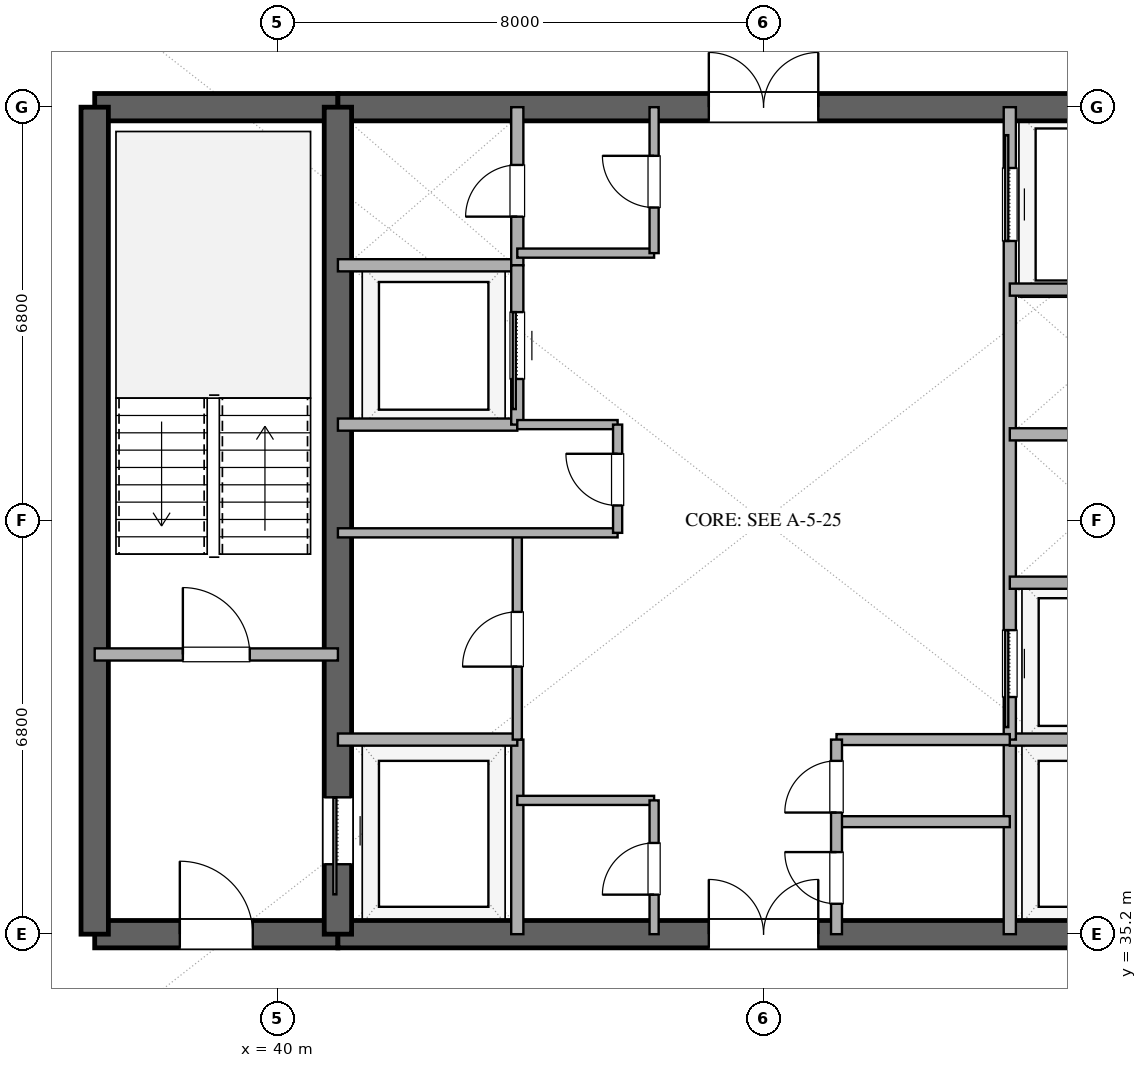
"""IFC4 building model, lengths in metres.
Left out: names, types, materials, properties, quantities, classifications, styles, units other than length and angle.
Written with IfcOpenShell. Run it as: python <this file> out.ifc"""

import sys

from ifc_helpers import new_model, si_unit, direction, frame, frame_2d, origin, place, context, subcontext, project, spatial, rectangle, extrude, element, fill, save


model = new_model("IFC4")
c1 = context("Model", 3, precision=1e-05, world=origin(), true_north=direction((0.0, 1.0)))
c2 = subcontext(c1, "Body", "Model", "MODEL_VIEW")
j1 = project(units=[si_unit("LENGTHUNIT", "METRE"), si_unit("PLANEANGLEUNIT", "RADIAN")], contexts=[c1])
p1 = place(None, origin())
s1 = spatial("IfcSite", under=j1, at=p1, CompositionType="ELEMENT")
p2 = place(p1, origin())
s2 = spatial("IfcBuilding", under=s1, at=p2, CompositionType="ELEMENT")
p3 = place(p2, frame((0.0, 0.0, 154.2)))
s3 = spatial("IfcBuildingStorey", under=s2, at=p3, CompositionType="ELEMENT", Elevation=154.2)
p4 = place(p3, frame((37.0, 35.2, 0.0), z_axis=(0.0, 0.0, 1.0), x_axis=(1.0, 0.0, 0.0)))
e1 = element("IfcWall", 1, at=p4, inside=s3, PredefinedType="SHEAR", context=c2, shape_type="SweptSolid", body=[
    extrude(rectangle(XDim=4.0, YDim=0.45, at=frame_2d((2.0, 0.0))), origin(), (0.0, 0.0, 1.0), 3.38),
])
p5 = place(p4, frame((1.4, 0.0, 0.0)))
e2 = element("IfcOpeningElement", 2, at=p5, cuts=e1, PredefinedType="OPENING", context=c2, shape_type="SweptSolid", body=[
    extrude(rectangle(XDim=1.2, YDim=2.15, at=frame_2d((0.6, 1.075))), frame((0.0, 0.235, 0.0), z_axis=(0.0, -1.0, 0.0), x_axis=(1.0, 0.0, 0.0)), (0.0, 0.0, 1.0), 0.47),
])
p6 = place(p3, frame((41.0, 35.2, 0.0), z_axis=(0.0, 0.0, 1.0), x_axis=(1.0, 0.0, 0.0)))
e3 = element("IfcWall", 3, at=p6, inside=s3, PredefinedType="SHEAR", context=c2, shape_type="SweptSolid", body=[
    extrude(rectangle(XDim=14.0, YDim=0.45, at=frame_2d((7.0, 0.0))), origin(), (0.0, 0.0, 1.0), 3.38),
])
p7 = place(p6, frame((6.1, 0.0, 0.0)))
e4 = element("IfcOpeningElement", 4, at=p7, cuts=e3, PredefinedType="OPENING", context=c2, shape_type="SweptSolid", body=[
    extrude(rectangle(XDim=1.8, YDim=2.25, at=frame_2d((0.9, 1.125))), frame((0.0, 0.235, 0.0), z_axis=(0.0, -1.0, 0.0), x_axis=(1.0, 0.0, 0.0)), (0.0, 0.0, 1.0), 0.47),
])
p8 = place(p3, frame((37.0, 48.8, 0.0), z_axis=(0.0, 0.0, 1.0), x_axis=(1.0, 0.0, 0.0)))
e5 = element("IfcWall", 5, at=p8, inside=s3, PredefinedType="SHEAR", context=c2, shape_type="SweptSolid", body=[
    extrude(rectangle(XDim=4.0, YDim=0.45, at=frame_2d((2.0, 0.0))), origin(), (0.0, 0.0, 1.0), 3.38),
])
p9 = place(p3, frame((41.0, 48.8, 0.0), z_axis=(0.0, 0.0, 1.0), x_axis=(1.0, 0.0, 0.0)))
e6 = element("IfcWall", 6, at=p9, inside=s3, PredefinedType="SHEAR", context=c2, shape_type="SweptSolid", body=[
    extrude(rectangle(XDim=14.0, YDim=0.45, at=frame_2d((7.0, 0.0))), origin(), (0.0, 0.0, 1.0), 3.38),
])
p10 = place(p9, frame((6.1, 0.0, 0.0)))
e7 = element("IfcOpeningElement", 7, at=p10, cuts=e6, PredefinedType="OPENING", context=c2, shape_type="SweptSolid", body=[
    extrude(rectangle(XDim=1.8, YDim=2.25, at=frame_2d((0.9, 1.125))), frame((0.0, 0.235, 0.0), z_axis=(0.0, -1.0, 0.0), x_axis=(1.0, 0.0, 0.0)), (0.0, 0.0, 1.0), 0.47),
])
p11 = place(p3, frame((37.0, 35.2, 0.0), z_axis=(0.0, 0.0, 1.0), x_axis=(0.0, 1.0, 0.0)))
e8 = element("IfcWall", 8, at=p11, inside=s3, PredefinedType="SHEAR", context=c2, shape_type="SweptSolid", body=[
    extrude(rectangle(XDim=13.6, YDim=0.45, at=frame_2d((6.8, 0.0))), origin(), (0.0, 0.0, 1.0), 3.38),
])
p12 = place(p3, frame((41.0, 35.2, 0.0), z_axis=(0.0, 0.0, 1.0), x_axis=(0.0, 1.0, 0.0)))
e9 = element("IfcWall", 9, at=p12, inside=s3, PredefinedType="SHEAR", context=c2, shape_type="SweptSolid", body=[
    extrude(rectangle(XDim=13.6, YDim=0.45, at=frame_2d((6.8, 0.0))), origin(), (0.0, 0.0, 1.0), 3.38),
])
p13 = place(p12, frame((1.15, 0.0, 0.0)))
e10 = element("IfcOpeningElement", 10, at=p13, cuts=e9, PredefinedType="OPENING", context=c2, shape_type="SweptSolid", body=[
    extrude(rectangle(XDim=1.1, YDim=2.2, at=frame_2d((0.55, 1.1))), frame((0.0, 0.235, 0.0), z_axis=(0.0, -1.0, 0.0), x_axis=(1.0, 0.0, 0.0)), (0.0, 0.0, 1.0), 0.47),
])
p14 = place(p3, frame((37.0, 39.8, 0.0), z_axis=(0.0, 0.0, 1.0), x_axis=(1.0, 0.0, 0.0)))
e11 = element("IfcWall", 11, at=p14, inside=s3, PredefinedType="SOLIDWALL", context=c2, shape_type="SweptSolid", body=[
    extrude(rectangle(XDim=4.0, YDim=0.2, at=frame_2d((2.0, 0.0))), origin(), (0.0, 0.0, 1.0), 2.74),
])
p15 = place(p14, frame((1.45, 0.0, 0.0)))
e12 = element("IfcOpeningElement", 12, at=p15, cuts=e11, PredefinedType="OPENING", context=c2, shape_type="SweptSolid", body=[
    extrude(rectangle(XDim=1.1, YDim=2.15, at=frame_2d((0.55, 1.075))), frame((0.0, 0.11, 0.0), z_axis=(0.0, -1.0, 0.0), x_axis=(1.0, 0.0, 0.0)), (0.0, 0.0, 1.0), 0.22),
])
p16 = place(p3, frame((43.95, 35.2, 0.0), z_axis=(0.0, 0.0, 1.0), x_axis=(0.0, 1.0, 0.0)))
e13 = element("IfcWall", 13, at=p16, inside=s3, PredefinedType="SOLIDWALL", context=c2, shape_type="SweptSolid", body=[
    extrude(rectangle(XDim=3.2, YDim=0.2, at=frame_2d((1.6, 0.0))), origin(), (0.0, 0.0, 1.0), 2.74),
])
p17 = place(p3, frame((41.0, 38.4, 0.0), z_axis=(0.0, 0.0, 1.0), x_axis=(1.0, 0.0, 0.0)))
e14 = element("IfcWall", 14, at=p17, inside=s3, PredefinedType="SOLIDWALL", context=c2, shape_type="SweptSolid", body=[
    extrude(rectangle(XDim=2.95, YDim=0.2, at=frame_2d((1.475, 0.0))), origin(), (0.0, 0.0, 1.0), 2.74),
])
p18 = place(p3, frame((52.05, 35.2, 0.0), z_axis=(0.0, 0.0, 1.0), x_axis=(0.0, 1.0, 0.0)))
e15 = element("IfcWall", 15, at=p18, inside=s3, PredefinedType="SOLIDWALL", context=c2, shape_type="SweptSolid", body=[
    extrude(rectangle(XDim=3.2, YDim=0.2, at=frame_2d((1.6, 0.0))), origin(), (0.0, 0.0, 1.0), 2.74),
])
for number, where, z_axis, x_axis in (
    (16, (52.05, 38.4, 0.0), (0.0, 0.0, 1.0), (1.0, 0.0, 0.0)),
    (17, (41.0, 46.2, 0.0), (0.0, 0.0, 1.0), (1.0, 0.0, 0.0)),
):
    element("IfcWall", number, at=place(p3, frame(where, z_axis=z_axis, x_axis=x_axis)), inside=s3, PredefinedType="SOLIDWALL", context=c2, shape_type="SweptSolid", body=[
        extrude(rectangle(XDim=2.95, YDim=0.2, at=frame_2d((1.475, 0.0))), origin(), (0.0, 0.0, 1.0), 2.74),
    ])
p19 = place(p3, frame((43.95, 46.2, 0.0), z_axis=(0.0, 0.0, 1.0), x_axis=(0.0, 1.0, 0.0)))
e18 = element("IfcWall", 18, at=p19, inside=s3, PredefinedType="SOLIDWALL", context=c2, shape_type="SweptSolid", body=[
    extrude(rectangle(XDim=2.6, YDim=0.2, at=frame_2d((1.3, 0.0))), origin(), (0.0, 0.0, 1.0), 2.74),
])
p20 = place(p19, frame((0.8, 0.0, 0.0)))
e19 = element("IfcOpeningElement", 19, at=p20, cuts=e18, PredefinedType="OPENING", context=c2, shape_type="SweptSolid", body=[
    extrude(rectangle(XDim=0.85, YDim=2.15, at=frame_2d((0.425, 1.075))), frame((0.0, 0.11, 0.0), z_axis=(0.0, -1.0, 0.0), x_axis=(1.0, 0.0, 0.0)), (0.0, 0.0, 1.0), 0.22),
])
p21 = place(p3, frame((41.0, 43.58, 0.0), z_axis=(0.0, 0.0, 1.0), x_axis=(1.0, 0.0, 0.0)))
e20 = element("IfcWall", 20, at=p21, inside=s3, PredefinedType="SOLIDWALL", context=c2, shape_type="SweptSolid", body=[
    extrude(rectangle(XDim=2.95, YDim=0.2, at=frame_2d((1.475, 0.0))), origin(), (0.0, 0.0, 1.0), 2.74),
])
p22 = place(p3, frame((43.95, 43.58, 0.0), z_axis=(0.0, 0.0, 1.0), x_axis=(0.0, 1.0, 0.0)))
e21 = element("IfcWall", 21, at=p22, inside=s3, PredefinedType="SOLIDWALL", context=c2, shape_type="SweptSolid", body=[
    extrude(rectangle(XDim=2.62, YDim=0.2, at=frame_2d((1.31, 0.0))), origin(), (0.0, 0.0, 1.0), 2.74),
])
p23 = place(p22, frame((0.75, 0.0, 0.0)))
e22 = element("IfcOpeningElement", 22, at=p23, cuts=e21, PredefinedType="OPENING", context=c2, shape_type="SweptSolid", body=[
    extrude(rectangle(XDim=1.1, YDim=2.2, at=frame_2d((0.55, 1.1))), frame((0.0, 0.11, 0.0), z_axis=(0.0, -1.0, 0.0), x_axis=(1.0, 0.0, 0.0)), (0.0, 0.0, 1.0), 0.22),
])
p24 = place(p3, frame((43.95, 38.4, 0.0), z_axis=(0.0, 0.0, 1.0), x_axis=(0.0, 1.0, 0.0)))
e23 = element("IfcWall", 23, at=p24, inside=s3, PredefinedType="PARTITIONING", context=c2, shape_type="SweptSolid", body=[
    extrude(rectangle(XDim=3.4, YDim=0.15, at=frame_2d((1.7, 0.0))), origin(), (0.0, 0.0, 1.0), 2.74),
])
p25 = place(p24, frame((1.2, 0.0, 0.0)))
e24 = element("IfcOpeningElement", 24, at=p25, cuts=e23, PredefinedType="OPENING", context=c2, shape_type="SweptSolid", body=[
    extrude(rectangle(XDim=0.9, YDim=2.15, at=frame_2d((0.45, 1.075))), frame((0.0, 0.085, 0.0), z_axis=(0.0, -1.0, 0.0), x_axis=(1.0, 0.0, 0.0)), (0.0, 0.0, 1.0), 0.17),
])
p26 = place(p3, frame((41.0, 41.8, 0.0), z_axis=(0.0, 0.0, 1.0), x_axis=(1.0, 0.0, 0.0)))
e25 = element("IfcWall", 25, at=p26, inside=s3, PredefinedType="PARTITIONING", context=c2, shape_type="SweptSolid", body=[
    extrude(rectangle(XDim=4.6, YDim=0.15, at=frame_2d((2.3, 0.0))), origin(), (0.0, 0.0, 1.0), 2.74),
])
p27 = place(p3, frame((43.95, 43.58, 0.0), z_axis=(0.0, 0.0, 1.0), x_axis=(1.0, 0.0, 0.0)))
e26 = element("IfcWall", 26, at=p27, inside=s3, PredefinedType="PARTITIONING", context=c2, shape_type="SweptSolid", body=[
    extrude(rectangle(XDim=1.65, YDim=0.15, at=frame_2d((0.825, 0.0))), origin(), (0.0, 0.0, 1.0), 2.74),
])
p28 = place(p3, frame((45.6, 41.8, 0.0), z_axis=(0.0, 0.0, 1.0), x_axis=(0.0, 1.0, 0.0)))
e27 = element("IfcWall", 27, at=p28, inside=s3, PredefinedType="PARTITIONING", context=c2, shape_type="SweptSolid", body=[
    extrude(rectangle(XDim=1.78, YDim=0.15, at=frame_2d((0.89, 0.0))), origin(), (0.0, 0.0, 1.0), 2.74),
])
p29 = place(p28, frame((0.45, 0.0, 0.0)))
e28 = element("IfcOpeningElement", 28, at=p29, cuts=e27, PredefinedType="OPENING", context=c2, shape_type="SweptSolid", body=[
    extrude(rectangle(XDim=0.85, YDim=2.15, at=frame_2d((0.425, 1.075))), frame((0.0, 0.085, 0.0), z_axis=(0.0, -1.0, 0.0), x_axis=(1.0, 0.0, 0.0)), (0.0, 0.0, 1.0), 0.17),
])
p30 = place(p3, frame((52.05, 38.4, 0.0), z_axis=(0.0, 0.0, 1.0), x_axis=(0.0, 1.0, 0.0)))
e29 = element("IfcWall", 29, at=p30, inside=s3, PredefinedType="SOLIDWALL", context=c2, shape_type="SweptSolid", body=[
    extrude(rectangle(XDim=10.4, YDim=0.2, at=frame_2d((5.2, 0.0))), origin(), (0.0, 0.0, 1.0), 2.74),
])
p31 = place(p30, frame((0.7, 0.0, 0.0)))
e30 = element("IfcOpeningElement", 30, at=p31, cuts=e29, PredefinedType="OPENING", context=c2, shape_type="SweptSolid", body=[
    extrude(rectangle(XDim=1.1, YDim=2.2, at=frame_2d((0.55, 1.1))), frame((0.0, 0.11, 0.0), z_axis=(0.0, -1.0, 0.0), x_axis=(1.0, 0.0, 0.0)), (0.0, 0.0, 1.0), 0.22),
])
p32 = place(p30, frame((8.2, 0.0, 0.0)))
e31 = element("IfcOpeningElement", 31, at=p32, cuts=e29, PredefinedType="OPENING", context=c2, shape_type="SweptSolid", body=[
    extrude(rectangle(XDim=1.2, YDim=2.2, at=frame_2d((0.6, 1.1))), frame((0.0, 0.11, 0.0), z_axis=(0.0, -1.0, 0.0), x_axis=(1.0, 0.0, 0.0)), (0.0, 0.0, 1.0), 0.22),
])
for number, where, z_axis, x_axis in (
    (32, (52.05, 40.98, 0.0), (0.0, 0.0, 1.0), (1.0, 0.0, 0.0)),
    (33, (52.05, 43.42, 0.0), (0.0, 0.0, 1.0), (1.0, 0.0, 0.0)),
    (34, (52.05, 45.8, 0.0), (0.0, 0.0, 1.0), (1.0, 0.0, 0.0)),
):
    element("IfcWall", number, at=place(p3, frame(where, z_axis=z_axis, x_axis=x_axis)), inside=s3, PredefinedType="SOLIDWALL", context=c2, shape_type="SweptSolid", body=[
        extrude(rectangle(XDim=2.95, YDim=0.2, at=frame_2d((1.475, 0.0))), origin(), (0.0, 0.0, 1.0), 2.74),
    ])
p33 = place(p3, frame((43.95, 37.4, 0.0), z_axis=(0.0, 0.0, 1.0), x_axis=(1.0, 0.0, 0.0)))
e35 = element("IfcWall", 35, at=p33, inside=s3, PredefinedType="PARTITIONING", context=c2, shape_type="SweptSolid", body=[
    extrude(rectangle(XDim=2.25, YDim=0.15, at=frame_2d((1.125, 0.0))), origin(), (0.0, 0.0, 1.0), 2.74),
])
p34 = place(p3, frame((46.2, 35.2, 0.0), z_axis=(0.0, 0.0, 1.0), x_axis=(0.0, 1.0, 0.0)))
e36 = element("IfcWall", 36, at=p34, inside=s3, PredefinedType="PARTITIONING", context=c2, shape_type="SweptSolid", body=[
    extrude(rectangle(XDim=2.2, YDim=0.15, at=frame_2d((1.1, 0.0))), origin(), (0.0, 0.0, 1.0), 2.74),
])
p35 = place(p34, frame((0.65, 0.0, 0.0)))
e37 = element("IfcOpeningElement", 37, at=p35, cuts=e36, PredefinedType="OPENING", context=c2, shape_type="SweptSolid", body=[
    extrude(rectangle(XDim=0.85, YDim=2.15, at=frame_2d((0.425, 1.075))), frame((0.0, 0.085, 0.0), z_axis=(0.0, -1.0, 0.0), x_axis=(1.0, 0.0, 0.0)), (0.0, 0.0, 1.0), 0.17),
])
p36 = place(p3, frame((43.95, 46.4, 0.0), z_axis=(0.0, 0.0, 1.0), x_axis=(1.0, 0.0, 0.0)))
e38 = element("IfcWall", 38, at=p36, inside=s3, PredefinedType="PARTITIONING", context=c2, shape_type="SweptSolid", body=[
    extrude(rectangle(XDim=2.25, YDim=0.15, at=frame_2d((1.125, 0.0))), origin(), (0.0, 0.0, 1.0), 2.74),
])
p37 = place(p3, frame((46.2, 46.4, 0.0), z_axis=(0.0, 0.0, 1.0), x_axis=(0.0, 1.0, 0.0)))
e39 = element("IfcWall", 39, at=p37, inside=s3, PredefinedType="PARTITIONING", context=c2, shape_type="SweptSolid", body=[
    extrude(rectangle(XDim=2.4, YDim=0.15, at=frame_2d((1.2, 0.0))), origin(), (0.0, 0.0, 1.0), 2.74),
])
p38 = place(p37, frame((0.75, 0.0, 0.0)))
e40 = element("IfcOpeningElement", 40, at=p38, cuts=e39, PredefinedType="OPENING", context=c2, shape_type="SweptSolid", body=[
    extrude(rectangle(XDim=0.85, YDim=2.15, at=frame_2d((0.425, 1.075))), frame((0.0, 0.085, 0.0), z_axis=(0.0, -1.0, 0.0), x_axis=(1.0, 0.0, 0.0)), (0.0, 0.0, 1.0), 0.17),
])
for number, where, z_axis, x_axis in (
    (41, (49.2, 37.05, 0.0), (0.0, 0.0, 1.0), (1.0, 0.0, 0.0)),
    (42, (49.2, 38.4, 0.0), (0.0, 0.0, 1.0), (1.0, 0.0, 0.0)),
):
    element("IfcWall", number, at=place(p3, frame(where, z_axis=z_axis, x_axis=x_axis)), inside=s3, PredefinedType="PLUMBINGWALL", context=c2, shape_type="SweptSolid", body=[
        extrude(rectangle(XDim=2.85, YDim=0.18, at=frame_2d((1.425, 0.0))), origin(), (0.0, 0.0, 1.0), 2.74),
    ])
p39 = place(p3, frame((49.2, 35.2, 0.0), z_axis=(0.0, 0.0, 1.0), x_axis=(0.0, 1.0, 0.0)))
e43 = element("IfcWall", 43, at=p39, inside=s3, PredefinedType="PLUMBINGWALL", context=c2, shape_type="SweptSolid", body=[
    extrude(rectangle(XDim=3.2, YDim=0.18, at=frame_2d((1.6, 0.0))), origin(), (0.0, 0.0, 1.0), 2.74),
])
p40 = place(p39, frame((0.5, 0.0, 0.0)))
e44 = element("IfcOpeningElement", 44, at=p40, cuts=e43, PredefinedType="OPENING", context=c2, shape_type="SweptSolid", body=[
    extrude(rectangle(XDim=0.85, YDim=2.1, at=frame_2d((0.425, 1.05))), frame((0.0, 0.1, 0.0), z_axis=(0.0, -1.0, 0.0), x_axis=(1.0, 0.0, 0.0)), (0.0, 0.0, 1.0), 0.2),
])
p41 = place(p39, frame((2.0, 0.0, 0.0)))
e45 = element("IfcOpeningElement", 45, at=p41, cuts=e43, PredefinedType="OPENING", context=c2, shape_type="SweptSolid", body=[
    extrude(rectangle(XDim=0.85, YDim=2.15, at=frame_2d((0.425, 1.075))), frame((0.0, 0.1, 0.0), z_axis=(0.0, -1.0, 0.0), x_axis=(1.0, 0.0, 0.0)), (0.0, 0.0, 1.0), 0.2),
])
p42 = place(p13, origin())
e46 = element("IfcDoor", 46, at=p42, inside=s3, OperationType="SLIDING_TO_LEFT", PredefinedType="DOOR", context=c2, shape_type="SweptSolid", body=[
    extrude(rectangle(XDim=1.1, YDim=2.2, at=frame_2d((0.55, 1.1))), frame((0.0, 0.025, 0.0), z_axis=(0.0, -1.0, 0.0), x_axis=(1.0, 0.0, 0.0)), (0.0, 0.0, 1.0), 0.05),
])
fill(e10, e46)
p43 = place(p5, origin())
e47 = element("IfcDoor", 47, at=p43, inside=s3, OperationType="SINGLE_SWING_LEFT", PredefinedType="DOOR", context=c2, shape_type="SweptSolid", body=[
    extrude(rectangle(XDim=1.2, YDim=2.15, at=frame_2d((0.6, 1.075))), frame((0.0, 0.025, 0.0), z_axis=(0.0, -1.0, 0.0), x_axis=(1.0, 0.0, 0.0)), (0.0, 0.0, 1.0), 0.05),
])
fill(e2, e47)
p44 = place(p7, origin())
e48 = element("IfcDoor", 48, at=p44, inside=s3, OperationType="DOUBLE_DOOR_SINGLE_SWING", PredefinedType="DOOR", context=c2, shape_type="SweptSolid", body=[
    extrude(rectangle(XDim=1.8, YDim=2.25, at=frame_2d((0.9, 1.125))), frame((0.0, 0.025, 0.0), z_axis=(0.0, -1.0, 0.0), x_axis=(1.0, 0.0, 0.0)), (0.0, 0.0, 1.0), 0.05),
])
fill(e4, e48)
p45 = place(p10, origin())
e49 = element("IfcDoor", 49, at=p45, inside=s3, OperationType="DOUBLE_DOOR_SINGLE_SWING", PredefinedType="DOOR", context=c2, shape_type="SweptSolid", body=[
    extrude(rectangle(XDim=1.8, YDim=2.25, at=frame_2d((0.9, 1.125))), frame((0.0, 0.025, 0.0), z_axis=(0.0, -1.0, 0.0), x_axis=(1.0, 0.0, 0.0)), (0.0, 0.0, 1.0), 0.05),
])
fill(e7, e49)
p46 = place(p15, origin())
e50 = element("IfcDoor", 50, at=p46, inside=s3, OperationType="SINGLE_SWING_LEFT", PredefinedType="DOOR", context=c2, shape_type="SweptSolid", body=[
    extrude(rectangle(XDim=1.1, YDim=2.15, at=frame_2d((0.55, 1.075))), frame((0.0, 0.025, 0.0), z_axis=(0.0, -1.0, 0.0), x_axis=(1.0, 0.0, 0.0)), (0.0, 0.0, 1.0), 0.05),
])
fill(e12, e50)
p47 = place(p20, origin())
e51 = element("IfcDoor", 51, at=p47, inside=s3, OperationType="SINGLE_SWING_LEFT", PredefinedType="DOOR", context=c2, shape_type="SweptSolid", body=[
    extrude(rectangle(XDim=0.85, YDim=2.15, at=frame_2d((0.425, 1.075))), frame((0.0, 0.025, 0.0), z_axis=(0.0, -1.0, 0.0), x_axis=(1.0, 0.0, 0.0)), (0.0, 0.0, 1.0), 0.05),
])
fill(e19, e51)
p48 = place(p23, origin())
e52 = element("IfcDoor", 52, at=p48, inside=s3, OperationType="SLIDING_TO_LEFT", PredefinedType="DOOR", context=c2, shape_type="SweptSolid", body=[
    extrude(rectangle(XDim=1.1, YDim=2.2, at=frame_2d((0.55, 1.1))), frame((0.0, 0.025, 0.0), z_axis=(0.0, -1.0, 0.0), x_axis=(1.0, 0.0, 0.0)), (0.0, 0.0, 1.0), 0.05),
])
fill(e22, e52)
p49 = place(p25, origin())
e53 = element("IfcDoor", 53, at=p49, inside=s3, OperationType="SINGLE_SWING_LEFT", PredefinedType="DOOR", context=c2, shape_type="SweptSolid", body=[
    extrude(rectangle(XDim=0.9, YDim=2.15, at=frame_2d((0.45, 1.075))), frame((0.0, 0.025, 0.0), z_axis=(0.0, -1.0, 0.0), x_axis=(1.0, 0.0, 0.0)), (0.0, 0.0, 1.0), 0.05),
])
fill(e24, e53)
p50 = place(p29, origin())
e54 = element("IfcDoor", 54, at=p50, inside=s3, OperationType="SINGLE_SWING_RIGHT", PredefinedType="DOOR", context=c2, shape_type="SweptSolid", body=[
    extrude(rectangle(XDim=0.85, YDim=2.15, at=frame_2d((0.425, 1.075))), frame((0.0, 0.025, 0.0), z_axis=(0.0, -1.0, 0.0), x_axis=(1.0, 0.0, 0.0)), (0.0, 0.0, 1.0), 0.05),
])
fill(e28, e54)
p51 = place(p31, origin())
e55 = element("IfcDoor", 55, at=p51, inside=s3, OperationType="SLIDING_TO_LEFT", PredefinedType="DOOR", context=c2, shape_type="SweptSolid", body=[
    extrude(rectangle(XDim=1.1, YDim=2.2, at=frame_2d((0.55, 1.1))), frame((0.0, 0.025, 0.0), z_axis=(0.0, -1.0, 0.0), x_axis=(1.0, 0.0, 0.0)), (0.0, 0.0, 1.0), 0.05),
])
fill(e30, e55)
p52 = place(p32, origin())
e56 = element("IfcDoor", 56, at=p52, inside=s3, OperationType="SLIDING_TO_RIGHT", PredefinedType="DOOR", context=c2, shape_type="SweptSolid", body=[
    extrude(rectangle(XDim=1.2, YDim=2.2, at=frame_2d((0.6, 1.1))), frame((0.0, 0.025, 0.0), z_axis=(0.0, -1.0, 0.0), x_axis=(1.0, 0.0, 0.0)), (0.0, 0.0, 1.0), 0.05),
])
fill(e31, e56)
p53 = place(p35, origin())
e57 = element("IfcDoor", 57, at=p53, inside=s3, OperationType="SINGLE_SWING_LEFT", PredefinedType="DOOR", context=c2, shape_type="SweptSolid", body=[
    extrude(rectangle(XDim=0.85, YDim=2.15, at=frame_2d((0.425, 1.075))), frame((0.0, 0.025, 0.0), z_axis=(0.0, -1.0, 0.0), x_axis=(1.0, 0.0, 0.0)), (0.0, 0.0, 1.0), 0.05),
])
fill(e37, e57)
p54 = place(p38, origin())
e58 = element("IfcDoor", 58, at=p54, inside=s3, OperationType="SINGLE_SWING_RIGHT", PredefinedType="DOOR", context=c2, shape_type="SweptSolid", body=[
    extrude(rectangle(XDim=0.85, YDim=2.15, at=frame_2d((0.425, 1.075))), frame((0.0, 0.025, 0.0), z_axis=(0.0, -1.0, 0.0), x_axis=(1.0, 0.0, 0.0)), (0.0, 0.0, 1.0), 0.05),
])
fill(e40, e58)
p55 = place(p40, origin())
e59 = element("IfcDoor", 59, at=p55, inside=s3, OperationType="SINGLE_SWING_RIGHT", PredefinedType="DOOR", context=c2, shape_type="SweptSolid", body=[
    extrude(rectangle(XDim=0.85, YDim=2.1, at=frame_2d((0.425, 1.05))), frame((0.0, 0.025, 0.0), z_axis=(0.0, -1.0, 0.0), x_axis=(1.0, 0.0, 0.0)), (0.0, 0.0, 1.0), 0.05),
])
fill(e44, e59)
p56 = place(p41, origin())
e60 = element("IfcDoor", 60, at=p56, inside=s3, OperationType="SINGLE_SWING_LEFT", PredefinedType="DOOR", context=c2, shape_type="SweptSolid", body=[
    extrude(rectangle(XDim=0.85, YDim=2.15, at=frame_2d((0.425, 1.075))), frame((0.0, 0.025, 0.0), z_axis=(0.0, -1.0, 0.0), x_axis=(1.0, 0.0, 0.0)), (0.0, 0.0, 1.0), 0.05),
])
fill(e45, e60)
save(model, sys.argv[1])
